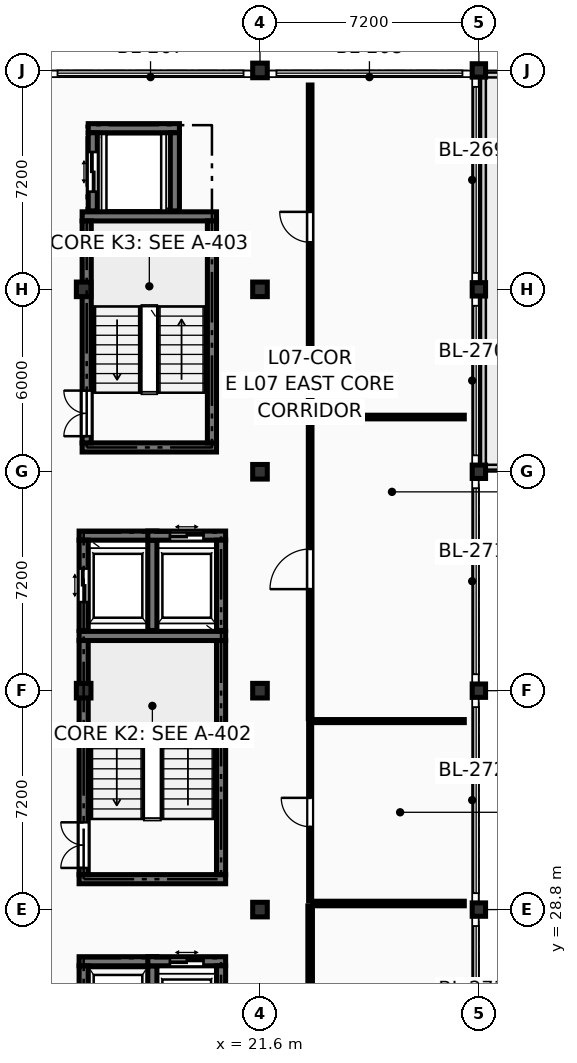
"""IFC4 building model, lengths in metres.
Left out: names, types, materials, properties, quantities, classifications, styles, units other than length and angle.
Written with IfcOpenShell. Run it as: python <this file> out.ifc"""

import sys

from ifc_helpers import new_model, si_unit, direction, frame, frame_2d, origin, origin_2d, place, context, subcontext, project, spatial, rectangle, extrude, element, fill, save


model = new_model("IFC4")
c1 = context("Model", 3, precision=1e-05, world=origin(), true_north=direction((0.0, 1.0)))
c2 = subcontext(c1, "Body", "Model", "MODEL_VIEW")
j1 = project(units=[si_unit("LENGTHUNIT", "METRE"), si_unit("PLANEANGLEUNIT", "RADIAN")], contexts=[c1])
p1 = place(None, origin())
s1 = spatial("IfcSite", under=j1, at=p1, CompositionType="ELEMENT")
p2 = place(p1, origin())
s2 = spatial("IfcBuilding", under=s1, at=p2, CompositionType="ELEMENT")
p3 = place(p2, frame((0.0, 0.0, 26.25)))
s3 = spatial("IfcBuildingStorey", under=s2, at=p3, CompositionType="ELEMENT", Elevation=26.25)
for number, where, z_axis, x_axis in (
    (1, (15.8, 36.0, 0.0), (0.0, 0.0, 1.0), (1.0, 0.0, 0.0)),
    (2, (15.8, 49.2, 0.0), (0.0, 0.0, 1.0), (1.0, 0.0, 0.0)),
    (3, (21.6, 28.8, 0.0), (0.0, 0.0, 1.0), (1.0, 0.0, 0.0)),
    (4, (21.6, 36.0, 0.0), (0.0, 0.0, 1.0), (1.0, 0.0, 0.0)),
    (5, (21.6, 43.2, 0.0), (0.0, 0.0, 1.0), (1.0, 0.0, 0.0)),
    (6, (21.6, 49.2, 0.0), (0.0, 0.0, 1.0), (1.0, 0.0, 0.0)),
    (7, (21.6, 56.4, 0.0), (0.0, 0.0, 1.0), (1.0, 0.0, 0.0)),
):
    element("IfcColumn", number, at=place(p3, frame(where, z_axis=z_axis, x_axis=x_axis)), inside=s3, PredefinedType="COLUMN", context=c2, shape_type="SweptSolid", body=[
        extrude(rectangle(XDim=0.48, YDim=0.48, at=origin_2d()), origin(), (0.0, 0.0, 1.0), 3.45),
    ])
for number, where, z_axis, x_axis in (
    (8, (28.8, 28.8, 0.0), (0.0, 0.0, 1.0), (1.0, 0.0, 0.0)),
    (9, (28.8, 36.0, 0.0), (0.0, 0.0, 1.0), (1.0, 0.0, 0.0)),
    (10, (28.8, 43.2, 0.0), (0.0, 0.0, 1.0), (1.0, 0.0, 0.0)),
    (11, (28.8, 49.2, 0.0), (0.0, 0.0, 1.0), (1.0, 0.0, 0.0)),
    (12, (28.8, 56.4, 0.0), (0.0, 0.0, 1.0), (1.0, 0.0, 0.0)),
):
    element("IfcColumn", number, at=place(p3, frame(where, z_axis=z_axis, x_axis=x_axis)), inside=s3, PredefinedType="COLUMN", context=c2, shape_type="SweptSolid", body=[
        extrude(rectangle(XDim=0.44, YDim=0.44, at=origin_2d()), origin(), (0.0, 0.0, 1.0), 3.45),
    ])
p4 = place(p3, frame((39.45, 56.25, 0.1), z_axis=(0.0, 0.0, 1.0), x_axis=(-1.0, 0.0, 0.0)))
e13 = element("IfcWall", 13, at=p4, inside=s3, PredefinedType="PARAPET", context=c2, shape_type="SweptSolid", body=[
    extrude(rectangle(XDim=10.5, YDim=0.16, at=frame_2d((5.25, 0.0))), origin(), (0.0, 0.0, 1.0), 1.0),
])
p5 = place(p3, frame((28.95, 56.25, 0.1), z_axis=(0.0, 0.0, 1.0), x_axis=(0.0, -1.0, 0.0)))
e14 = element("IfcWall", 14, at=p5, inside=s3, PredefinedType="PARAPET", context=c2, shape_type="SweptSolid", body=[
    extrude(rectangle(XDim=12.9, YDim=0.16, at=frame_2d((6.45, 0.0))), origin(), (0.0, 0.0, 1.0), 1.0),
])
p6 = place(p3, frame((28.95, 43.35, 0.1), z_axis=(0.0, 0.0, 1.0), x_axis=(1.0, 0.0, 0.0)))
e15 = element("IfcWall", 15, at=p6, inside=s3, PredefinedType="PARAPET", context=c2, shape_type="SweptSolid", body=[
    extrude(rectangle(XDim=10.5, YDim=0.16, at=frame_2d((5.25, 0.0))), origin(), (0.0, 0.0, 1.0), 1.0),
])
for number, where, z_axis, x_axis in (
    (16, (15.65, 29.8, 0.0), (0.0, 0.0, 1.0), (1.0, 0.0, 0.0)),
    (17, (15.65, 37.8, 0.0), (0.0, 0.0, 1.0), (1.0, 0.0, 0.0)),
):
    element("IfcWall", number, at=place(p3, frame(where, z_axis=z_axis, x_axis=x_axis)), inside=s3, PredefinedType="SHEAR", context=c2, shape_type="SweptSolid", body=[
        extrude(rectangle(XDim=4.82, YDim=0.3, at=frame_2d((2.41, 0.0))), origin(), (0.0, 0.0, 1.0), 3.24),
    ])
p7 = place(p3, frame((15.8, 29.95, 0.0), z_axis=(0.0, 0.0, 1.0), x_axis=(0.0, 1.0, 0.0)))
e18 = element("IfcWall", 18, at=p7, inside=s3, PredefinedType="SHEAR", context=c2, shape_type="SweptSolid", body=[
    extrude(rectangle(XDim=7.7, YDim=0.3, at=frame_2d((3.85, 0.0))), origin(), (0.0, 0.0, 1.0), 3.24),
])
p8 = place(p7, frame((0.22, 0.0, 0.0)))
e19 = element("IfcOpeningElement", 19, at=p8, cuts=e18, PredefinedType="OPENING", context=c2, shape_type="SweptSolid", body=[
    extrude(rectangle(XDim=1.5, YDim=2.2, at=frame_2d((0.75, 1.1))), frame((0.0, 0.162, 0.0), z_axis=(0.0, -1.0, 0.0), x_axis=(1.0, 0.0, 0.0)), (0.0, 0.0, 1.0), 0.324),
])
p9 = place(p3, frame((20.32, 29.95, 0.0), z_axis=(0.0, 0.0, 1.0), x_axis=(0.0, 1.0, 0.0)))
e20 = element("IfcWall", 20, at=p9, inside=s3, PredefinedType="SHEAR", context=c2, shape_type="SweptSolid", body=[
    extrude(rectangle(XDim=7.7, YDim=0.3, at=frame_2d((3.85, 0.0))), origin(), (0.0, 0.0, 1.0), 3.24),
])
for number, where, z_axis, x_axis in (
    (21, (15.75, 44.0, 0.0), (0.0, 0.0, 1.0), (1.0, 0.0, 0.0)),
    (22, (15.75, 51.6, 0.0), (0.0, 0.0, 1.0), (1.0, 0.0, 0.0)),
):
    element("IfcWall", number, at=place(p3, frame(where, z_axis=z_axis, x_axis=x_axis)), inside=s3, PredefinedType="SHEAR", context=c2, shape_type="SweptSolid", body=[
        extrude(rectangle(XDim=4.42, YDim=0.3, at=frame_2d((2.21, 0.0))), origin(), (0.0, 0.0, 1.0), 3.24),
    ])
p10 = place(p3, frame((15.9, 44.15, 0.0), z_axis=(0.0, 0.0, 1.0), x_axis=(0.0, 1.0, 0.0)))
e23 = element("IfcWall", 23, at=p10, inside=s3, PredefinedType="SHEAR", context=c2, shape_type="SweptSolid", body=[
    extrude(rectangle(XDim=7.3, YDim=0.3, at=frame_2d((3.65, 0.0))), origin(), (0.0, 0.0, 1.0), 3.24),
])
p11 = place(p10, frame((0.22, 0.0, 0.0)))
e24 = element("IfcOpeningElement", 24, at=p11, cuts=e23, PredefinedType="OPENING", context=c2, shape_type="SweptSolid", body=[
    extrude(rectangle(XDim=1.5, YDim=2.2, at=frame_2d((0.75, 1.1))), frame((0.0, 0.162, 0.0), z_axis=(0.0, -1.0, 0.0), x_axis=(1.0, 0.0, 0.0)), (0.0, 0.0, 1.0), 0.324),
])
p12 = place(p3, frame((20.02, 44.15, 0.0), z_axis=(0.0, 0.0, 1.0), x_axis=(0.0, 1.0, 0.0)))
e25 = element("IfcWall", 25, at=p12, inside=s3, PredefinedType="SHEAR", context=c2, shape_type="SweptSolid", body=[
    extrude(rectangle(XDim=7.3, YDim=0.3, at=frame_2d((3.65, 0.0))), origin(), (0.0, 0.0, 1.0), 3.24),
])
p13 = place(p3, frame((15.65, 27.1, 0.0), z_axis=(0.0, 0.0, 1.0), x_axis=(1.0, 0.0, 0.0)))
e26 = element("IfcWall", 26, at=p13, inside=s3, PredefinedType="SHEAR", context=c2, shape_type="SweptSolid", body=[
    extrude(rectangle(XDim=2.56, YDim=0.3, at=frame_2d((1.28, 0.0))), origin(), (0.0, 0.0, 1.0), 3.24),
])
p14 = place(p3, frame((15.8, 23.98, 0.0), z_axis=(0.0, 0.0, 1.0), x_axis=(0.0, 1.0, 0.0)))
e27 = element("IfcWall", 27, at=p14, inside=s3, PredefinedType="SHEAR", context=c2, shape_type="SweptSolid", body=[
    extrude(rectangle(XDim=2.97, YDim=0.3, at=frame_2d((1.485, 0.0))), origin(), (0.0, 0.0, 1.0), 3.24),
])
p15 = place(p14, frame((0.835, 0.0, 0.0)))
e28 = element("IfcOpeningElement", 28, at=p15, cuts=e27, PredefinedType="OPENING", context=c2, shape_type="SweptSolid", body=[
    extrude(rectangle(XDim=1.3, YDim=2.25, at=frame_2d((0.65, 1.125))), frame((0.0, 0.162, 0.0), z_axis=(0.0, -1.0, 0.0), x_axis=(1.0, 0.0, 0.0)), (0.0, 0.0, 1.0), 0.324),
])
p16 = place(p3, frame((18.06, 23.98, 0.0), z_axis=(0.0, 0.0, 1.0), x_axis=(0.0, 1.0, 0.0)))
e29 = element("IfcWall", 29, at=p16, inside=s3, PredefinedType="SHEAR", context=c2, shape_type="SweptSolid", body=[
    extrude(rectangle(XDim=2.97, YDim=0.3, at=frame_2d((1.485, 0.0))), origin(), (0.0, 0.0, 1.0), 3.24),
])
p17 = place(p3, frame((17.91, 27.1, 0.0), z_axis=(0.0, 0.0, 1.0), x_axis=(1.0, 0.0, 0.0)))
e30 = element("IfcWall", 30, at=p17, inside=s3, PredefinedType="SHEAR", context=c2, shape_type="SweptSolid", body=[
    extrude(rectangle(XDim=2.56, YDim=0.3, at=frame_2d((1.28, 0.0))), origin(), (0.0, 0.0, 1.0), 3.24),
])
p18 = place(p17, frame((0.73, 0.0, 0.0)))
e31 = element("IfcOpeningElement", 31, at=p18, cuts=e30, PredefinedType="OPENING", context=c2, shape_type="SweptSolid", body=[
    extrude(rectangle(XDim=1.1, YDim=2.2, at=frame_2d((0.55, 1.1))), frame((0.0, 0.162, 0.0), z_axis=(0.0, -1.0, 0.0), x_axis=(1.0, 0.0, 0.0)), (0.0, 0.0, 1.0), 0.324),
])
p19 = place(p3, frame((20.32, 23.98, 0.0), z_axis=(0.0, 0.0, 1.0), x_axis=(0.0, 1.0, 0.0)))
e32 = element("IfcWall", 32, at=p19, inside=s3, PredefinedType="SHEAR", context=c2, shape_type="SweptSolid", body=[
    extrude(rectangle(XDim=2.97, YDim=0.3, at=frame_2d((1.485, 0.0))), origin(), (0.0, 0.0, 1.0), 3.24),
])
p20 = place(p3, frame((15.65, 41.1, 0.0), z_axis=(0.0, 0.0, 1.0), x_axis=(1.0, 0.0, 0.0)))
e33 = element("IfcWall", 33, at=p20, inside=s3, PredefinedType="SHEAR", context=c2, shape_type="SweptSolid", body=[
    extrude(rectangle(XDim=2.56, YDim=0.3, at=frame_2d((1.28, 0.0))), origin(), (0.0, 0.0, 1.0), 3.24),
])
p21 = place(p3, frame((15.8, 37.98, 0.0), z_axis=(0.0, 0.0, 1.0), x_axis=(0.0, 1.0, 0.0)))
e34 = element("IfcWall", 34, at=p21, inside=s3, PredefinedType="SHEAR", context=c2, shape_type="SweptSolid", body=[
    extrude(rectangle(XDim=2.97, YDim=0.3, at=frame_2d((1.485, 0.0))), origin(), (0.0, 0.0, 1.0), 3.24),
])
p22 = place(p21, frame((0.935, 0.0, 0.0)))
e35 = element("IfcOpeningElement", 35, at=p22, cuts=e34, PredefinedType="OPENING", context=c2, shape_type="SweptSolid", body=[
    extrude(rectangle(XDim=1.1, YDim=2.2, at=frame_2d((0.55, 1.1))), frame((0.0, 0.162, 0.0), z_axis=(0.0, -1.0, 0.0), x_axis=(1.0, 0.0, 0.0)), (0.0, 0.0, 1.0), 0.324),
])
p23 = place(p3, frame((18.06, 37.98, 0.0), z_axis=(0.0, 0.0, 1.0), x_axis=(0.0, 1.0, 0.0)))
e36 = element("IfcWall", 36, at=p23, inside=s3, PredefinedType="SHEAR", context=c2, shape_type="SweptSolid", body=[
    extrude(rectangle(XDim=2.97, YDim=0.3, at=frame_2d((1.485, 0.0))), origin(), (0.0, 0.0, 1.0), 3.24),
])
p24 = place(p3, frame((17.91, 41.1, 0.0), z_axis=(0.0, 0.0, 1.0), x_axis=(1.0, 0.0, 0.0)))
e37 = element("IfcWall", 37, at=p24, inside=s3, PredefinedType="SHEAR", context=c2, shape_type="SweptSolid", body=[
    extrude(rectangle(XDim=2.56, YDim=0.3, at=frame_2d((1.28, 0.0))), origin(), (0.0, 0.0, 1.0), 3.24),
])
p25 = place(p24, frame((0.73, 0.0, 0.0)))
e38 = element("IfcOpeningElement", 38, at=p25, cuts=e37, PredefinedType="OPENING", context=c2, shape_type="SweptSolid", body=[
    extrude(rectangle(XDim=1.1, YDim=2.2, at=frame_2d((0.55, 1.1))), frame((0.0, 0.162, 0.0), z_axis=(0.0, -1.0, 0.0), x_axis=(1.0, 0.0, 0.0)), (0.0, 0.0, 1.0), 0.324),
])
p26 = place(p3, frame((20.32, 37.98, 0.0), z_axis=(0.0, 0.0, 1.0), x_axis=(0.0, 1.0, 0.0)))
e39 = element("IfcWall", 39, at=p26, inside=s3, PredefinedType="SHEAR", context=c2, shape_type="SweptSolid", body=[
    extrude(rectangle(XDim=2.97, YDim=0.3, at=frame_2d((1.485, 0.0))), origin(), (0.0, 0.0, 1.0), 3.24),
])
p27 = place(p3, frame((15.95, 54.5, 0.0), z_axis=(0.0, 0.0, 1.0), x_axis=(1.0, 0.0, 0.0)))
e40 = element("IfcWall", 40, at=p27, inside=s3, PredefinedType="SHEAR", context=c2, shape_type="SweptSolid", body=[
    extrude(rectangle(XDim=3.0, YDim=0.3, at=frame_2d((1.5, 0.0))), origin(), (0.0, 0.0, 1.0), 3.24),
])
p28 = place(p3, frame((16.1, 51.78, 0.0), z_axis=(0.0, 0.0, 1.0), x_axis=(0.0, 1.0, 0.0)))
e41 = element("IfcWall", 41, at=p28, inside=s3, PredefinedType="SHEAR", context=c2, shape_type="SweptSolid", body=[
    extrude(rectangle(XDim=2.57, YDim=0.3, at=frame_2d((1.285, 0.0))), origin(), (0.0, 0.0, 1.0), 3.24),
])
p29 = place(p28, frame((0.635, 0.0, 0.0)))
e42 = element("IfcOpeningElement", 42, at=p29, cuts=e41, PredefinedType="OPENING", context=c2, shape_type="SweptSolid", body=[
    extrude(rectangle(XDim=1.3, YDim=2.25, at=frame_2d((0.65, 1.125))), frame((0.0, 0.162, 0.0), z_axis=(0.0, -1.0, 0.0), x_axis=(1.0, 0.0, 0.0)), (0.0, 0.0, 1.0), 0.324),
])
p30 = place(p3, frame((18.8, 51.78, 0.0), z_axis=(0.0, 0.0, 1.0), x_axis=(0.0, 1.0, 0.0)))
e43 = element("IfcWall", 43, at=p30, inside=s3, PredefinedType="SHEAR", context=c2, shape_type="SweptSolid", body=[
    extrude(rectangle(XDim=2.57, YDim=0.3, at=frame_2d((1.285, 0.0))), origin(), (0.0, 0.0, 1.0), 3.24),
])
p31 = place(p3, frame((23.25, 14.88, 0.0), z_axis=(0.0, 0.0, 1.0), x_axis=(0.0, 1.0, 0.0)))
e44 = element("IfcWall", 44, at=p31, inside=s3, PredefinedType="PARTITIONING", context=c2, shape_type="SweptSolid", body=[
    extrude(rectangle(XDim=14.04, YDim=0.15, at=frame_2d((7.02, 0.0))), origin(), (0.0, 0.0, 1.0), 3.225),
])
p32 = place(p31, frame((8.132, 0.0, 0.0)))
e45 = element("IfcOpeningElement", 45, at=p32, cuts=e44, PredefinedType="OPENING", context=c2, shape_type="SweptSolid", body=[
    extrude(rectangle(XDim=1.35, YDim=2.2, at=frame_2d((0.675, 1.1))), frame((0.0, 0.087, 0.0), z_axis=(0.0, -1.0, 0.0), x_axis=(1.0, 0.0, 0.0)), (0.0, 0.0, 1.0), 0.174),
])
p33 = place(p3, frame((23.33, 29.0, 0.0), z_axis=(0.0, 0.0, 1.0), x_axis=(1.0, 0.0, 0.0)))
e46 = element("IfcWall", 46, at=p33, inside=s3, PredefinedType="PARTITIONING", context=c2, shape_type="SweptSolid", body=[
    extrude(rectangle(XDim=4.99, YDim=0.15, at=frame_2d((2.495, 0.0))), origin(), (0.0, 0.0, 1.0), 2.541),
])
p34 = place(p3, frame((23.25, 29.08, 0.0), z_axis=(0.0, 0.0, 1.0), x_axis=(0.0, 1.0, 0.0)))
e47 = element("IfcWall", 47, at=p34, inside=s3, PredefinedType="PARTITIONING", context=c2, shape_type="SweptSolid", body=[
    extrude(rectangle(XDim=5.84, YDim=0.1, at=frame_2d((2.92, 0.0))), origin(), (0.0, 0.0, 1.0), 3.225),
])
p35 = place(p34, frame((2.445, 0.0, 0.0)))
e48 = element("IfcOpeningElement", 48, at=p35, cuts=e47, PredefinedType="OPENING", context=c2, shape_type="SweptSolid", body=[
    extrude(rectangle(XDim=0.95, YDim=2.1, at=frame_2d((0.475, 1.05))), frame((0.0, 0.062, 0.0), z_axis=(0.0, -1.0, 0.0), x_axis=(1.0, 0.0, 0.0)), (0.0, 0.0, 1.0), 0.124),
])
p36 = place(p3, frame((23.33, 35.0, 0.0), z_axis=(0.0, 0.0, 1.0), x_axis=(1.0, 0.0, 0.0)))
e49 = element("IfcWall", 49, at=p36, inside=s3, PredefinedType="PARTITIONING", context=c2, shape_type="SweptSolid", body=[
    extrude(rectangle(XDim=4.99, YDim=0.1, at=frame_2d((2.495, 0.0))), origin(), (0.0, 0.0, 1.0), 3.225),
])
p37 = place(p3, frame((23.25, 35.08, 0.0), z_axis=(0.0, 0.0, 1.0), x_axis=(0.0, 1.0, 0.0)))
e50 = element("IfcWall", 50, at=p37, inside=s3, PredefinedType="PARTITIONING", context=c2, shape_type="SweptSolid", body=[
    extrude(rectangle(XDim=9.84, YDim=0.12, at=frame_2d((4.92, 0.0))), origin(), (0.0, 0.0, 1.0), 3.225),
])
p38 = place(p37, frame((4.26, 0.0, 0.0)))
e51 = element("IfcOpeningElement", 51, at=p38, cuts=e50, PredefinedType="OPENING", context=c2, shape_type="SweptSolid", body=[
    extrude(rectangle(XDim=1.32, YDim=2.2, at=frame_2d((0.66, 1.1))), frame((0.0, 0.072, 0.0), z_axis=(0.0, -1.0, 0.0), x_axis=(1.0, 0.0, 0.0)), (0.0, 0.0, 1.0), 0.144),
])
p39 = place(p3, frame((23.33, 45.0, 0.0), z_axis=(0.0, 0.0, 1.0), x_axis=(1.0, 0.0, 0.0)))
e52 = element("IfcWall", 52, at=p39, inside=s3, PredefinedType="PARTITIONING", context=c2, shape_type="SweptSolid", body=[
    extrude(rectangle(XDim=4.99, YDim=0.12, at=frame_2d((2.495, 0.0))), origin(), (0.0, 0.0, 1.0), 3.225),
])
p40 = place(p3, frame((23.25, 45.08, 0.0), z_axis=(0.0, 0.0, 1.0), x_axis=(0.0, 1.0, 0.0)))
e53 = element("IfcWall", 53, at=p40, inside=s3, PredefinedType="PARTITIONING", context=c2, shape_type="SweptSolid", body=[
    extrude(rectangle(XDim=10.84, YDim=0.12, at=frame_2d((5.42, 0.0))), origin(), (0.0, 0.0, 1.0), 3.225),
])
p41 = place(p40, frame((5.668, 0.0, 0.0)))
e54 = element("IfcOpeningElement", 54, at=p41, cuts=e53, PredefinedType="OPENING", context=c2, shape_type="SweptSolid", body=[
    extrude(rectangle(XDim=1.0, YDim=2.15, at=frame_2d((0.5, 1.075))), frame((0.0, 0.072, 0.0), z_axis=(0.0, -1.0, 0.0), x_axis=(1.0, 0.0, 0.0)), (0.0, 0.0, 1.0), 0.144),
])
p42 = place(p8, origin())
e55 = element("IfcDoor", 55, at=p42, inside=s3, OperationType="DOUBLE_DOOR_SINGLE_SWING", PredefinedType="DOOR", context=c2, shape_type="SweptSolid", body=[
    extrude(rectangle(XDim=1.5, YDim=2.2, at=frame_2d((0.75, 1.1))), frame((0.0, 0.025, 0.0), z_axis=(0.0, -1.0, 0.0), x_axis=(1.0, 0.0, 0.0)), (0.0, 0.0, 1.0), 0.05),
])
fill(e19, e55)
p43 = place(p11, origin())
e56 = element("IfcDoor", 56, at=p43, inside=s3, OperationType="DOUBLE_DOOR_SINGLE_SWING", PredefinedType="DOOR", context=c2, shape_type="SweptSolid", body=[
    extrude(rectangle(XDim=1.5, YDim=2.2, at=frame_2d((0.75, 1.1))), frame((0.0, 0.025, 0.0), z_axis=(0.0, -1.0, 0.0), x_axis=(1.0, 0.0, 0.0)), (0.0, 0.0, 1.0), 0.05),
])
fill(e24, e56)
p44 = place(p18, origin())
e57 = element("IfcDoor", 57, at=p44, inside=s3, OperationType="DOUBLE_DOOR_SLIDING", PredefinedType="DOOR", context=c2, shape_type="SweptSolid", body=[
    extrude(rectangle(XDim=1.1, YDim=2.2, at=frame_2d((0.55, 1.1))), frame((0.0, 0.025, 0.0), z_axis=(0.0, -1.0, 0.0), x_axis=(1.0, 0.0, 0.0)), (0.0, 0.0, 1.0), 0.05),
])
fill(e31, e57)
p45 = place(p22, origin())
e58 = element("IfcDoor", 58, at=p45, inside=s3, OperationType="DOUBLE_DOOR_SLIDING", PredefinedType="DOOR", context=c2, shape_type="SweptSolid", body=[
    extrude(rectangle(XDim=1.1, YDim=2.2, at=frame_2d((0.55, 1.1))), frame((0.0, 0.025, 0.0), z_axis=(0.0, -1.0, 0.0), x_axis=(1.0, 0.0, 0.0)), (0.0, 0.0, 1.0), 0.05),
])
fill(e35, e58)
p46 = place(p25, origin())
e59 = element("IfcDoor", 59, at=p46, inside=s3, OperationType="DOUBLE_DOOR_SLIDING", PredefinedType="DOOR", context=c2, shape_type="SweptSolid", body=[
    extrude(rectangle(XDim=1.1, YDim=2.2, at=frame_2d((0.55, 1.1))), frame((0.0, 0.025, 0.0), z_axis=(0.0, -1.0, 0.0), x_axis=(1.0, 0.0, 0.0)), (0.0, 0.0, 1.0), 0.05),
])
fill(e38, e59)
p47 = place(p29, origin())
e60 = element("IfcDoor", 60, at=p47, inside=s3, OperationType="DOUBLE_DOOR_SLIDING", PredefinedType="DOOR", context=c2, shape_type="SweptSolid", body=[
    extrude(rectangle(XDim=1.3, YDim=2.25, at=frame_2d((0.65, 1.125))), frame((0.0, 0.025, 0.0), z_axis=(0.0, -1.0, 0.0), x_axis=(1.0, 0.0, 0.0)), (0.0, 0.0, 1.0), 0.05),
])
fill(e42, e60)
p48 = place(p35, origin())
e61 = element("IfcDoor", 61, at=p48, inside=s3, OperationType="SINGLE_SWING_RIGHT", PredefinedType="DOOR", context=c2, shape_type="SweptSolid", body=[
    extrude(rectangle(XDim=0.95, YDim=2.1, at=frame_2d((0.475, 1.05))), frame((0.0, 0.025, 0.0), z_axis=(0.0, -1.0, 0.0), x_axis=(1.0, 0.0, 0.0)), (0.0, 0.0, 1.0), 0.05),
])
fill(e48, e61)
p49 = place(p38, origin())
e62 = element("IfcDoor", 62, at=p49, inside=s3, OperationType="SINGLE_SWING_LEFT", PredefinedType="DOOR", context=c2, shape_type="SweptSolid", body=[
    extrude(rectangle(XDim=1.32, YDim=2.2, at=frame_2d((0.66, 1.1))), frame((0.0, 0.025, 0.0), z_axis=(0.0, -1.0, 0.0), x_axis=(1.0, 0.0, 0.0)), (0.0, 0.0, 1.0), 0.05),
])
fill(e51, e62)
p50 = place(p41, origin())
e63 = element("IfcDoor", 63, at=p50, inside=s3, OperationType="SINGLE_SWING_RIGHT", PredefinedType="DOOR", context=c2, shape_type="SweptSolid", body=[
    extrude(rectangle(XDim=1.0, YDim=2.15, at=frame_2d((0.5, 1.075))), frame((0.0, 0.025, 0.0), z_axis=(0.0, -1.0, 0.0), x_axis=(1.0, 0.0, 0.0)), (0.0, 0.0, 1.0), 0.05),
])
fill(e54, e63)
save(model, sys.argv[1])
